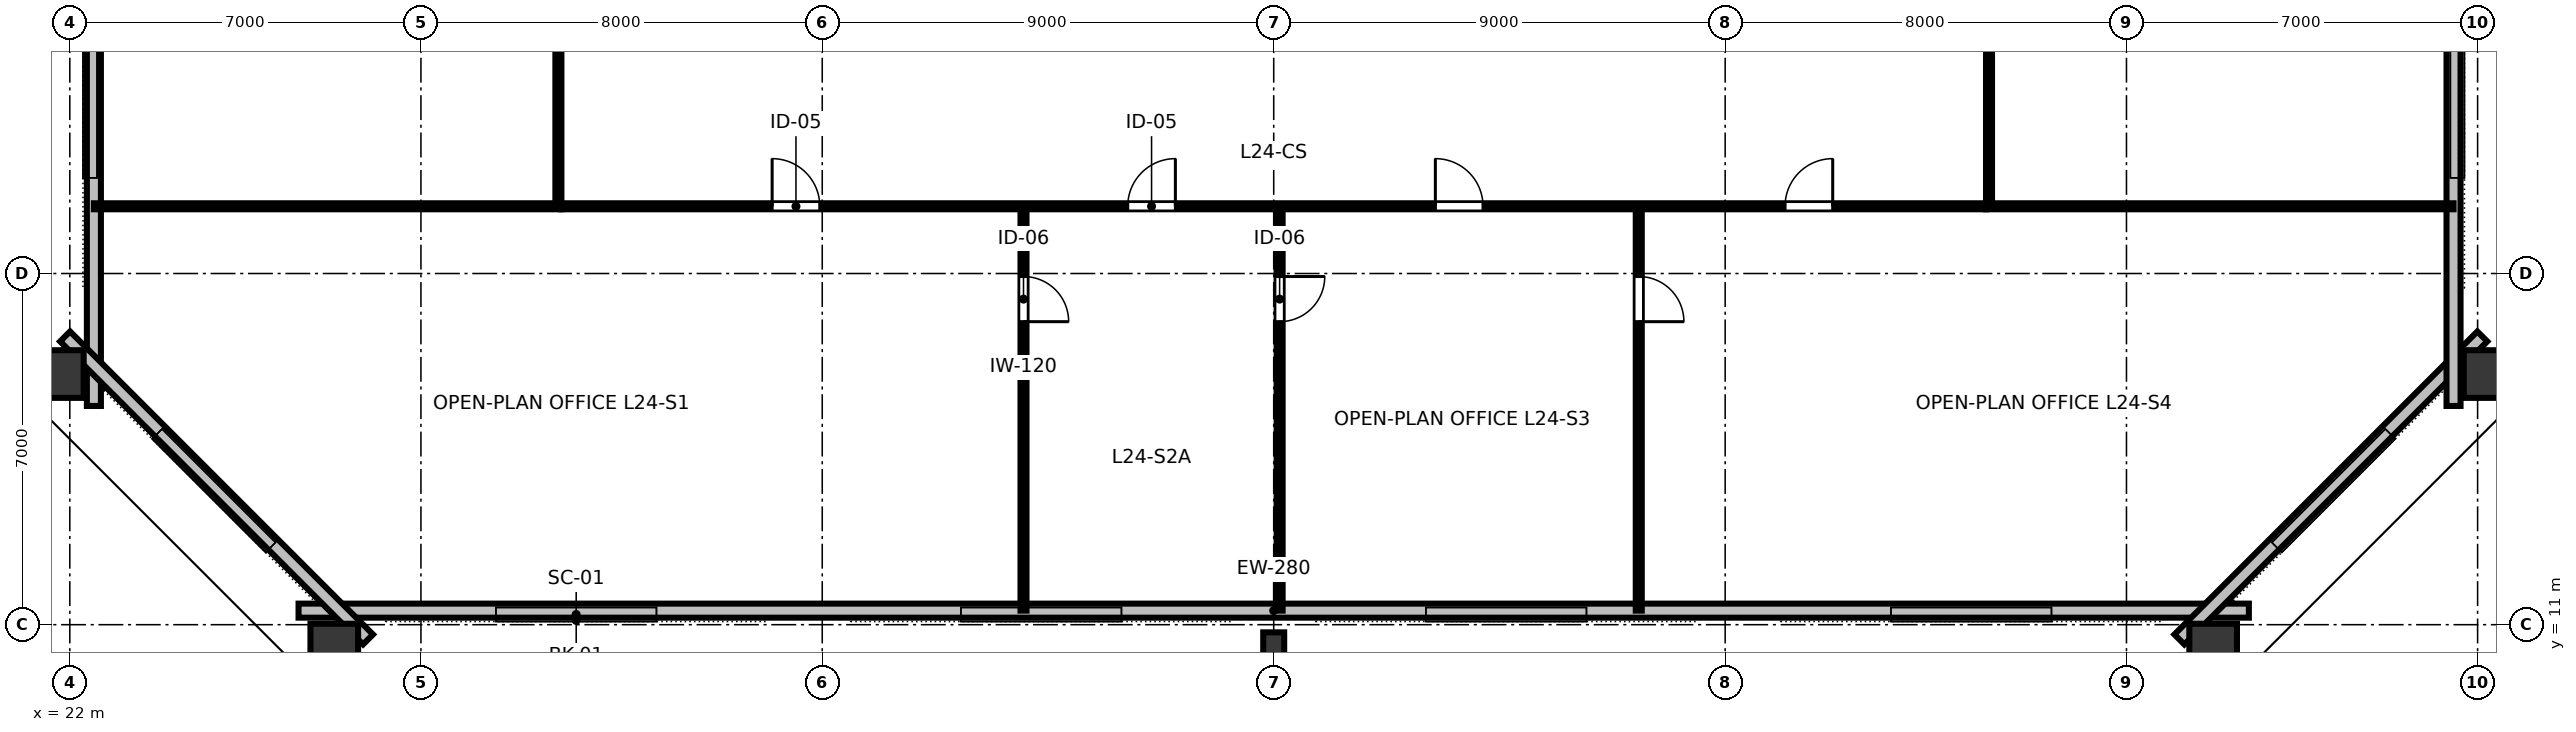
"""IFC4 building model, lengths in metres.
Left out: names, types, materials, properties, quantities, classifications, styles, units other than length and angle.
Written with IfcOpenShell. Run it as: python <this file> out.ifc"""

import sys

from ifc_helpers import new_model, si_unit, direction, frame, frame_2d, origin, origin_2d, place, context, subcontext, project, spatial, rectangle, hollow_rectangle, i_section, extrude, element, fill, save


model = new_model("IFC4")
c1 = context("Model", 3, precision=1e-05, world=origin(), true_north=direction((0.0, 1.0)))
c2 = subcontext(c1, "Body", "Model", "MODEL_VIEW")
j1 = project(units=[si_unit("LENGTHUNIT", "METRE"), si_unit("PLANEANGLEUNIT", "RADIAN")], contexts=[c1])
p1 = place(None, origin())
s1 = spatial("IfcSite", under=j1, at=p1, CompositionType="ELEMENT")
p2 = place(p1, origin())
s2 = spatial("IfcBuilding", under=s1, at=p2, CompositionType="ELEMENT")
p3 = place(p2, frame((0.0, 0.0, 95.2)))
s3 = spatial("IfcBuildingStorey", under=s2, at=p3, CompositionType="ELEMENT", Elevation=95.2)
p4 = place(p3, frame((27.272, 10.444, 0.0), z_axis=(0.0, 0.0, 1.0), x_axis=(1.0, 0.0, 0.0)))
e1 = element("IfcColumn", 1, at=p4, inside=s3, PredefinedType="COLUMN", context=c2, shape_type="SweptSolid", body=[
    extrude(hollow_rectangle(XDim=0.95, YDim=1.15, WallThickness=0.06, at=origin_2d()), origin(), (0.0, 0.0, 1.0), 3.358),
])
p5 = place(p3, frame((46.0, 10.62, 0.0), z_axis=(0.0, 0.0, 1.0), x_axis=(1.0, 0.0, 0.0)))
e2 = element("IfcColumn", 2, at=p5, inside=s3, PredefinedType="COLUMN", context=c2, shape_type="SweptSolid", body=[
    extrude(i_section(OverallWidth=0.418, OverallDepth=0.455, WebThickness=0.042, FlangeThickness=0.068, FilletRadius=0.025, at=origin_2d()), origin(), (0.0, 0.0, 1.0), 3.358),
])
for number, where, z_axis, x_axis in (
    (3, (64.728, 10.444, 0.0), (0.0, 0.0, 1.0), (1.0, 0.0, 0.0)),
    (4, (70.299, 15.996, 0.0), (0.0, 0.0, 1.0), (0.0, 1.0, 0.0)),
    (5, (21.701, 15.996, 0.0), (0.0, 0.0, 1.0), (0.0, 1.0, 0.0)),
):
    element("IfcColumn", number, at=place(p3, frame(where, z_axis=z_axis, x_axis=x_axis)), inside=s3, PredefinedType="COLUMN", context=c2, shape_type="SweptSolid", body=[
        extrude(hollow_rectangle(XDim=0.95, YDim=1.15, WallThickness=0.06, at=origin_2d()), origin(), (0.0, 0.0, 1.0), 3.358),
    ])
p6 = place(p3, frame((26.56, 11.28, 0.0), z_axis=(0.0, 0.0, 1.0), x_axis=(1.0, 0.0, 0.0)))
e6 = element("IfcWall", 6, at=p6, inside=s3, PredefinedType="STANDARD", context=c2, shape_type="SweptSolid", body=[
    extrude(rectangle(XDim=38.88, YDim=0.28, at=frame_2d((19.44, 0.0))), origin(), (0.0, 0.0, 1.0), 3.36),
])
p7 = place(p3, frame((64.054, 10.706, 0.0), z_axis=(0.0, 0.0, 1.0), x_axis=(0.707106781187, 0.707106781187, 0.0)))
e7 = element("IfcWall", 7, at=p7, inside=s3, PredefinedType="STANDARD", context=c2, shape_type="SweptSolid", body=[
    extrude(rectangle(XDim=8.541, YDim=0.28, at=frame_2d((4.271, 0.0))), origin(), (0.0, 0.0, 1.0), 3.36),
])
for number, where, z_axis, x_axis in (
    (8, (69.52, 15.36, 0.0), (0.0, 0.0, 1.0), (0.0, 1.0, 0.0)),
    (9, (22.48, 48.64, 0.0), (0.0, 0.0, 1.0), (0.0, -1.0, 0.0)),
):
    element("IfcWall", number, at=place(p3, frame(where, z_axis=z_axis, x_axis=x_axis)), inside=s3, PredefinedType="STANDARD", context=c2, shape_type="SweptSolid", body=[
        extrude(rectangle(XDim=33.28, YDim=0.28, at=frame_2d((16.64, 0.0))), origin(), (0.0, 0.0, 1.0), 3.36),
    ])
p8 = place(p3, frame((21.906, 16.746, 0.0), z_axis=(0.0, 0.0, 1.0), x_axis=(0.707106781187, -0.707106781187, 0.0)))
e10 = element("IfcWall", 10, at=p8, inside=s3, PredefinedType="STANDARD", context=c2, shape_type="SweptSolid", body=[
    extrude(rectangle(XDim=8.541, YDim=0.28, at=frame_2d((4.271, 0.0))), origin(), (0.0, 0.0, 1.0), 3.36),
])
p9 = place(p3, frame((41.012, 19.34, 0.0), z_axis=(0.0, 0.0, 1.0), x_axis=(0.0, -1.0, 0.0)))
e11 = element("IfcWall", 11, at=p9, inside=s3, PredefinedType="PARTITIONING", context=c2, shape_type="SweptSolid", body=[
    extrude(rectangle(XDim=8.06, YDim=0.12, at=frame_2d((4.03, 0.0))), origin(), (0.0, 0.0, 1.0), 2.64),
])
p10 = place(p9, frame((1.4, 0.0, 0.0)))
e12 = element("IfcOpeningElement", 12, at=p10, cuts=e11, PredefinedType="OPENING", context=c2, shape_type="SweptSolid", body=[
    extrude(rectangle(XDim=0.9, YDim=2.15, at=frame_2d((0.45, 1.075))), frame((0.0, 0.07, 0.0), z_axis=(0.0, -1.0, 0.0), x_axis=(1.0, 0.0, 0.0)), (0.0, 0.0, 1.0), 0.14),
])
p11 = place(p3, frame((46.118, 19.34, 0.0), z_axis=(0.0, 0.0, 1.0), x_axis=(0.0, -1.0, 0.0)))
e13 = element("IfcWall", 13, at=p11, inside=s3, PredefinedType="PARTITIONING", context=c2, shape_type="SweptSolid", body=[
    extrude(rectangle(XDim=8.06, YDim=0.12, at=frame_2d((4.03, 0.0))), origin(), (0.0, 0.0, 1.0), 2.64),
])
p12 = place(p11, frame((1.4, 0.0, 0.0)))
e14 = element("IfcOpeningElement", 14, at=p12, cuts=e13, PredefinedType="OPENING", context=c2, shape_type="SweptSolid", body=[
    extrude(rectangle(XDim=0.9, YDim=2.15, at=frame_2d((0.45, 1.075))), frame((0.0, 0.07, 0.0), z_axis=(0.0, -1.0, 0.0), x_axis=(1.0, 0.0, 0.0)), (0.0, 0.0, 1.0), 0.14),
])
p13 = place(p3, frame((53.277, 19.34, 0.0), z_axis=(0.0, 0.0, 1.0), x_axis=(0.0, -1.0, 0.0)))
e15 = element("IfcWall", 15, at=p13, inside=s3, PredefinedType="PARTITIONING", context=c2, shape_type="SweptSolid", body=[
    extrude(rectangle(XDim=8.06, YDim=0.12, at=frame_2d((4.03, 0.0))), origin(), (0.0, 0.0, 1.0), 2.64),
])
p14 = place(p13, frame((1.4, 0.0, 0.0)))
e16 = element("IfcOpeningElement", 16, at=p14, cuts=e15, PredefinedType="OPENING", context=c2, shape_type="SweptSolid", body=[
    extrude(rectangle(XDim=0.9, YDim=2.15, at=frame_2d((0.45, 1.075))), frame((0.0, 0.07, 0.0), z_axis=(0.0, -1.0, 0.0), x_axis=(1.0, 0.0, 0.0)), (0.0, 0.0, 1.0), 0.14),
])
p15 = place(p3, frame((31.8, 19.34, 0.0), z_axis=(0.0, 0.0, 1.0), x_axis=(1.0, 0.0, 0.0)))
e17 = element("IfcWall", 17, at=p15, inside=s3, PredefinedType="PARTITIONING", context=c2, shape_type="SweptSolid", body=[
    extrude(rectangle(XDim=28.4, YDim=0.12, at=frame_2d((14.2, 0.0))), origin(), (0.0, 0.0, 1.0), 2.64),
])
p16 = place(p15, frame((4.201, 0.0, 0.0)))
e18 = element("IfcOpeningElement", 18, at=p16, cuts=e17, PredefinedType="OPENING", context=c2, shape_type="SweptSolid", body=[
    extrude(rectangle(XDim=0.95, YDim=2.15, at=frame_2d((0.475, 1.075))), frame((0.0, 0.07, 0.0), z_axis=(0.0, -1.0, 0.0), x_axis=(1.0, 0.0, 0.0)), (0.0, 0.0, 1.0), 0.14),
])
p17 = place(p15, frame((11.29, 0.0, 0.0)))
e19 = element("IfcOpeningElement", 19, at=p17, cuts=e17, PredefinedType="OPENING", context=c2, shape_type="SweptSolid", body=[
    extrude(rectangle(XDim=0.95, YDim=2.15, at=frame_2d((0.475, 1.075))), frame((0.0, 0.07, 0.0), z_axis=(0.0, -1.0, 0.0), x_axis=(1.0, 0.0, 0.0)), (0.0, 0.0, 1.0), 0.14),
])
p18 = place(p15, frame((17.423, 0.0, 0.0)))
e20 = element("IfcOpeningElement", 20, at=p18, cuts=e17, PredefinedType="OPENING", context=c2, shape_type="SweptSolid", body=[
    extrude(rectangle(XDim=0.95, YDim=2.15, at=frame_2d((0.475, 1.075))), frame((0.0, 0.07, 0.0), z_axis=(0.0, -1.0, 0.0), x_axis=(1.0, 0.0, 0.0)), (0.0, 0.0, 1.0), 0.14),
])
p19 = place(p15, frame((24.394, 0.0, 0.0)))
e21 = element("IfcOpeningElement", 21, at=p19, cuts=e17, PredefinedType="OPENING", context=c2, shape_type="SweptSolid", body=[
    extrude(rectangle(XDim=0.95, YDim=2.15, at=frame_2d((0.475, 1.075))), frame((0.0, 0.07, 0.0), z_axis=(0.0, -1.0, 0.0), x_axis=(1.0, 0.0, 0.0)), (0.0, 0.0, 1.0), 0.14),
])
p20 = place(p3, frame((31.74, 19.4, 0.0), z_axis=(0.0, 0.0, 1.0), x_axis=(0.0, 1.0, 0.0)))
e22 = element("IfcWall", 22, at=p20, inside=s3, PredefinedType="PARTITIONING", context=c2, shape_type="SweptSolid", body=[
    extrude(rectangle(XDim=11.58, YDim=0.12, at=frame_2d((5.79, 0.0))), origin(), (0.0, 0.0, 1.0), 2.64),
])
p21 = place(p20, frame((5.415, 0.0, 0.0)))
e23 = element("IfcOpeningElement", 23, at=p21, cuts=e22, PredefinedType="OPENING", context=c2, shape_type="SweptSolid", body=[
    extrude(rectangle(XDim=0.95, YDim=2.15, at=frame_2d((0.475, 1.075))), frame((0.0, 0.07, 0.0), z_axis=(0.0, -1.0, 0.0), x_axis=(1.0, 0.0, 0.0)), (0.0, 0.0, 1.0), 0.14),
])
p22 = place(p3, frame((60.26, 19.4, 0.0), z_axis=(0.0, 0.0, 1.0), x_axis=(0.0, 1.0, 0.0)))
e24 = element("IfcWall", 24, at=p22, inside=s3, PredefinedType="PARTITIONING", context=c2, shape_type="SweptSolid", body=[
    extrude(rectangle(XDim=11.58, YDim=0.12, at=frame_2d((5.79, 0.0))), origin(), (0.0, 0.0, 1.0), 2.64),
])
p23 = place(p22, frame((5.415, 0.0, 0.0)))
e25 = element("IfcOpeningElement", 25, at=p23, cuts=e24, PredefinedType="OPENING", context=c2, shape_type="SweptSolid", body=[
    extrude(rectangle(XDim=0.95, YDim=2.15, at=frame_2d((0.475, 1.075))), frame((0.0, 0.07, 0.0), z_axis=(0.0, -1.0, 0.0), x_axis=(1.0, 0.0, 0.0)), (0.0, 0.0, 1.0), 0.14),
])
for number, where, z_axis, x_axis in (
    (26, (31.8, 19.34, 0.0), (0.0, 0.0, 1.0), (-1.0, 0.0, 0.0)),
    (27, (60.2, 19.34, 0.0), (0.0, 0.0, 1.0), (1.0, 0.0, 0.0)),
):
    element("IfcWall", number, at=place(p3, frame(where, z_axis=z_axis, x_axis=x_axis)), inside=s3, PredefinedType="PARTITIONING", context=c2, shape_type="SweptSolid", body=[
        extrude(rectangle(XDim=9.32, YDim=0.12, at=frame_2d((4.66, 0.0))), origin(), (0.0, 0.0, 1.0), 2.64),
    ])
p24 = place(p10, origin())
e28 = element("IfcDoor", 28, at=p24, inside=s3, OperationType="SINGLE_SWING_RIGHT", PredefinedType="DOOR", context=c2, shape_type="SweptSolid", body=[
    extrude(rectangle(XDim=0.9, YDim=2.15, at=frame_2d((0.45, 1.075))), frame((0.0, 0.025, 0.0), z_axis=(0.0, -1.0, 0.0), x_axis=(1.0, 0.0, 0.0)), (0.0, 0.0, 1.0), 0.05),
])
fill(e12, e28)
p25 = place(p12, origin())
e29 = element("IfcDoor", 29, at=p25, inside=s3, OperationType="SINGLE_SWING_LEFT", PredefinedType="DOOR", context=c2, shape_type="SweptSolid", body=[
    extrude(rectangle(XDim=0.9, YDim=2.15, at=frame_2d((0.45, 1.075))), frame((0.0, 0.025, 0.0), z_axis=(0.0, -1.0, 0.0), x_axis=(1.0, 0.0, 0.0)), (0.0, 0.0, 1.0), 0.05),
])
fill(e14, e29)
p26 = place(p14, origin())
e30 = element("IfcDoor", 30, at=p26, inside=s3, OperationType="SINGLE_SWING_RIGHT", PredefinedType="DOOR", context=c2, shape_type="SweptSolid", body=[
    extrude(rectangle(XDim=0.9, YDim=2.15, at=frame_2d((0.45, 1.075))), frame((0.0, 0.025, 0.0), z_axis=(0.0, -1.0, 0.0), x_axis=(1.0, 0.0, 0.0)), (0.0, 0.0, 1.0), 0.05),
])
fill(e16, e30)
p27 = place(p16, origin())
e31 = element("IfcDoor", 31, at=p27, inside=s3, OperationType="SINGLE_SWING_LEFT", PredefinedType="DOOR", context=c2, shape_type="SweptSolid", body=[
    extrude(rectangle(XDim=0.95, YDim=2.15, at=frame_2d((0.475, 1.075))), frame((0.0, 0.025, 0.0), z_axis=(0.0, -1.0, 0.0), x_axis=(1.0, 0.0, 0.0)), (0.0, 0.0, 1.0), 0.05),
])
fill(e18, e31)
p28 = place(p17, origin())
e32 = element("IfcDoor", 32, at=p28, inside=s3, OperationType="SINGLE_SWING_RIGHT", PredefinedType="DOOR", context=c2, shape_type="SweptSolid", body=[
    extrude(rectangle(XDim=0.95, YDim=2.15, at=frame_2d((0.475, 1.075))), frame((0.0, 0.025, 0.0), z_axis=(0.0, -1.0, 0.0), x_axis=(1.0, 0.0, 0.0)), (0.0, 0.0, 1.0), 0.05),
])
fill(e19, e32)
p29 = place(p18, origin())
e33 = element("IfcDoor", 33, at=p29, inside=s3, OperationType="SINGLE_SWING_LEFT", PredefinedType="DOOR", context=c2, shape_type="SweptSolid", body=[
    extrude(rectangle(XDim=0.95, YDim=2.15, at=frame_2d((0.475, 1.075))), frame((0.0, 0.025, 0.0), z_axis=(0.0, -1.0, 0.0), x_axis=(1.0, 0.0, 0.0)), (0.0, 0.0, 1.0), 0.05),
])
fill(e20, e33)
p30 = place(p19, origin())
e34 = element("IfcDoor", 34, at=p30, inside=s3, OperationType="SINGLE_SWING_RIGHT", PredefinedType="DOOR", context=c2, shape_type="SweptSolid", body=[
    extrude(rectangle(XDim=0.95, YDim=2.15, at=frame_2d((0.475, 1.075))), frame((0.0, 0.025, 0.0), z_axis=(0.0, -1.0, 0.0), x_axis=(1.0, 0.0, 0.0)), (0.0, 0.0, 1.0), 0.05),
])
fill(e21, e34)
save(model, sys.argv[1])
